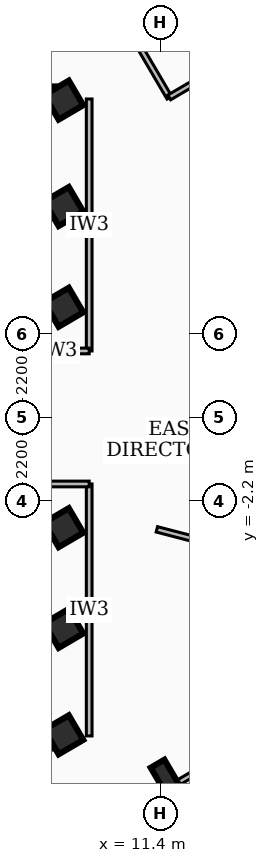
"""IFC4 building model, lengths in metres.
Left out: names, types, materials, properties, quantities, classifications, styles, units other than length and angle.
Written with IfcOpenShell. Run it as: python <this file> out.ifc"""

import sys

from ifc_helpers import new_model, si_unit, direction, frame, frame_2d, origin, origin_2d, place, context, subcontext, project, spatial, rectangle, i_section, extrude, element, save


model = new_model("IFC4")
c1 = context("Model", 3, precision=1e-05, world=origin(), true_north=direction((0.0, 1.0)))
c2 = subcontext(c1, "Body", "Model", "MODEL_VIEW")
j1 = project(units=[si_unit("LENGTHUNIT", "METRE"), si_unit("PLANEANGLEUNIT", "RADIAN")], contexts=[c1])
p1 = place(None, origin())
s1 = spatial("IfcSite", under=j1, at=p1, CompositionType="ELEMENT")
p2 = place(p1, origin())
s2 = spatial("IfcBuilding", under=s1, at=p2, CompositionType="ELEMENT")
p3 = place(p2, frame((0.0, 0.0, 212.04)))
s3 = spatial("IfcBuildingStorey", under=s2, at=p3, CompositionType="ELEMENT", Elevation=212.04)
for number, where, z_axis, x_axis in (
    (1, (-8.78, 8.51, 0.0), (0.0, 0.0, 1.0), (1.0, 0.0, 0.0)),
    (2, (8.78, -8.51, 0.0), (0.0, 0.0, 1.0), (-1.0, 0.0, 0.0)),
):
    element("IfcWall", number, at=place(p3, frame(where, z_axis=z_axis, x_axis=x_axis)), inside=s3, PredefinedType="SHEAR", context=c2, shape_type="SweptSolid", body=[
        extrude(rectangle(XDim=17.56, YDim=0.4, at=frame_2d((8.78, 0.0))), origin(), (0.0, 0.0, 1.0), 3.16),
    ])
for number, where, z_axis, x_axis in (
    (3, (8.85, -5.55, 0.0), (0.0, 0.0, 1.0), (0.863, 0.506, 0.0)),
    (4, (8.85, -2.9, 0.0), (0.0, 0.0, 1.0), (0.863, 0.506, 0.0)),
    (5, (8.85, 2.9, 0.0), (0.0, 0.0, 1.0), (0.863, 0.506, 0.0)),
    (6, (8.85, 5.55, 0.0), (0.0, 0.0, 1.0), (0.863, 0.506, 0.0)),
    (7, (8.85, -8.35, 0.0), (0.0, 0.0, 1.0), (0.863, 0.506, 0.0)),
    (8, (8.85, 8.35, 0.0), (0.0, 0.0, 1.0), (0.863, 0.506, 0.0)),
):
    element("IfcColumn", number, at=place(p3, frame(where, z_axis=z_axis, x_axis=x_axis)), inside=s3, PredefinedType="COLUMN", context=c2, shape_type="SweptSolid", body=[
        extrude(rectangle(XDim=0.75, YDim=0.75, at=origin_2d()), origin(), (0.0, 0.0, 1.0), 3.42),
    ])
p4 = place(p3, frame((11.554, -9.51, 0.0), z_axis=(0.0, 0.0, 1.0), x_axis=(0.862513669207, 0.506033764121, 0.0)))
e9 = element("IfcColumn", 9, at=p4, inside=s3, PredefinedType="COLUMN", context=c2, shape_type="SweptSolid", body=[
    extrude(i_section(OverallWidth=0.418, OverallDepth=0.927, WebThickness=0.019, FlangeThickness=0.032, at=origin_2d()), origin(), (0.0, 0.0, 1.0), 3.42),
])
p5 = place(p3, frame((9.52, 1.75, 0.0), z_axis=(0.0, 0.0, 1.0), x_axis=(0.0, 1.0, 0.0)))
e10 = element("IfcWall", 10, at=p5, inside=s3, PredefinedType="PARTITIONING", context=c2, shape_type="SweptSolid", body=[
    extrude(rectangle(XDim=6.63, YDim=0.15, at=frame_2d((3.315, 0.0))), origin(), (0.0, 0.0, 1.0), 2.53),
])
p6 = place(p3, frame((7.85, 1.75, 0.0), z_axis=(0.0, 0.0, 1.0), x_axis=(1.0, 0.0, 0.0)))
e11 = element("IfcWall", 11, at=p6, inside=s3, PredefinedType="PARTITIONING", context=c2, shape_type="SweptSolid", body=[
    extrude(rectangle(XDim=1.67, YDim=0.15, at=frame_2d((0.835, 0.0))), origin(), (0.0, 0.0, 1.0), 2.39),
])
p7 = place(p3, frame((9.52, -8.38, 0.0), z_axis=(0.0, 0.0, 1.0), x_axis=(0.0, 1.0, 0.0)))
e12 = element("IfcWall", 12, at=p7, inside=s3, PredefinedType="PARTITIONING", context=c2, shape_type="SweptSolid", body=[
    extrude(rectangle(XDim=6.63, YDim=0.15, at=frame_2d((3.315, 0.0))), origin(), (0.0, 0.0, 1.0), 3.16),
])
p8 = place(p3, frame((7.85, -1.75, 0.0), z_axis=(0.0, 0.0, 1.0), x_axis=(1.0, 0.0, 0.0)))
e13 = element("IfcWall", 13, at=p8, inside=s3, PredefinedType="PARTITIONING", context=c2, shape_type="SweptSolid", body=[
    extrude(rectangle(XDim=1.67, YDim=0.15, at=frame_2d((0.835, 0.0))), origin(), (0.0, 0.0, 1.0), 2.39),
])
p9 = place(p3, frame((11.3, -2.944, 0.0), z_axis=(0.0, 0.0, 1.0), x_axis=(0.967711624716, -0.252059936106, 0.0)))
e14 = element("IfcWall", 14, at=p9, inside=s3, PredefinedType="PARTITIONING", context=c2, shape_type="SweptSolid", body=[
    extrude(rectangle(XDim=8.018, YDim=0.145, at=frame_2d((4.009, 0.0))), origin(), (0.0, 0.0, 1.0), 3.16),
])
p10 = place(p3, frame((11.632, 8.413, 0.0), z_axis=(0.0, 0.0, 1.0), x_axis=(-0.506057561451, 0.862499706955, 0.0)))
e15 = element("IfcWall", 15, at=p10, inside=s3, PredefinedType="PARTITIONING", context=c2, shape_type="SweptSolid", body=[
    extrude(rectangle(XDim=7.95, YDim=0.145, at=frame_2d((3.975, 0.0))), origin(), (0.0, 0.0, 1.0), 2.53),
])
p11 = place(p3, frame((14.654, 10.198, 0.0), z_axis=(0.0, 0.0, 1.0), x_axis=(-0.862375516706, -0.506269165747, 0.0)))
e16 = element("IfcWall", 16, at=p11, inside=s3, PredefinedType="PARTITIONING", context=c2, shape_type="SweptSolid", body=[
    extrude(rectangle(XDim=3.51, YDim=0.145, at=frame_2d((1.755, 0.0))), origin(), (0.0, 0.0, 1.0), 2.53),
])
p12 = place(p11, frame((1.305, 0.0, 0.0)))
e17 = element("IfcOpeningElement", 17, at=p12, cuts=e16, PredefinedType="OPENING", context=c2, shape_type="SweptSolid", body=[
    extrude(rectangle(XDim=1.3, YDim=2.1, at=frame_2d((0.65, 1.05))), frame((0.0, 0.083, 0.0), z_axis=(0.0, -1.0, 0.0), x_axis=(1.0, 0.0, 0.0)), (0.0, 0.0, 1.0), 0.165),
])
p13 = place(p3, frame((12.198, 14.385, 0.0), z_axis=(0.0, 0.0, 1.0), x_axis=(0.506037527975, -0.862511460956, 0.0)))
e18 = element("IfcWall", 18, at=p13, inside=s3, PredefinedType="PARTITIONING", context=c2, shape_type="SweptSolid", body=[
    extrude(rectangle(XDim=12.469, YDim=0.145, at=frame_2d((6.235, 0.0))), origin(), (0.0, 0.0, 1.0), 2.53),
])
p14 = place(p13, frame((6.655, 0.0, 0.0)))
e19 = element("IfcOpeningElement", 19, at=p14, cuts=e18, PredefinedType="OPENING", context=c2, shape_type="SweptSolid", body=[
    extrude(rectangle(XDim=0.86, YDim=2.04, at=frame_2d((0.43, 1.02))), frame((0.0, 0.083, 0.0), z_axis=(0.0, -1.0, 0.0), x_axis=(1.0, 0.0, 0.0)), (0.0, 0.0, 1.0), 0.165),
])
p15 = place(p13, frame((5.455, 0.0, 0.0)))
e20 = element("IfcOpeningElement", 20, at=p15, cuts=e18, PredefinedType="OPENING", context=c2, shape_type="SweptSolid", body=[
    extrude(rectangle(XDim=0.86, YDim=2.04, at=frame_2d((0.43, 1.02))), frame((0.0, 0.083, 0.0), z_axis=(0.0, -1.0, 0.0), x_axis=(1.0, 0.0, 0.0)), (0.0, 0.0, 1.0), 0.165),
])
p16 = place(p3, frame((15.873, -7.255, 0.0), z_axis=(0.0, 0.0, 1.0), x_axis=(-0.862498672631, -0.506059324299, 0.0)))
e21 = element("IfcWall", 21, at=p16, inside=s3, PredefinedType="PARTITIONING", context=c2, shape_type="SweptSolid", body=[
    extrude(rectangle(XDim=20.039, YDim=0.145, at=frame_2d((10.02, 0.0))), origin(), (0.0, 0.0, 1.0), 2.53),
])
p17 = place(p16, frame((9.42, 0.0, 0.0)))
e22 = element("IfcOpeningElement", 22, at=p17, cuts=e21, PredefinedType="OPENING", context=c2, shape_type="SweptSolid", body=[
    extrude(rectangle(XDim=1.2, YDim=2.1, at=frame_2d((0.6, 1.05))), frame((0.0, 0.083, 0.0), z_axis=(0.0, -1.0, 0.0), x_axis=(1.0, 0.0, 0.0)), (0.0, 0.0, 1.0), 0.165),
])
save(model, sys.argv[1])
